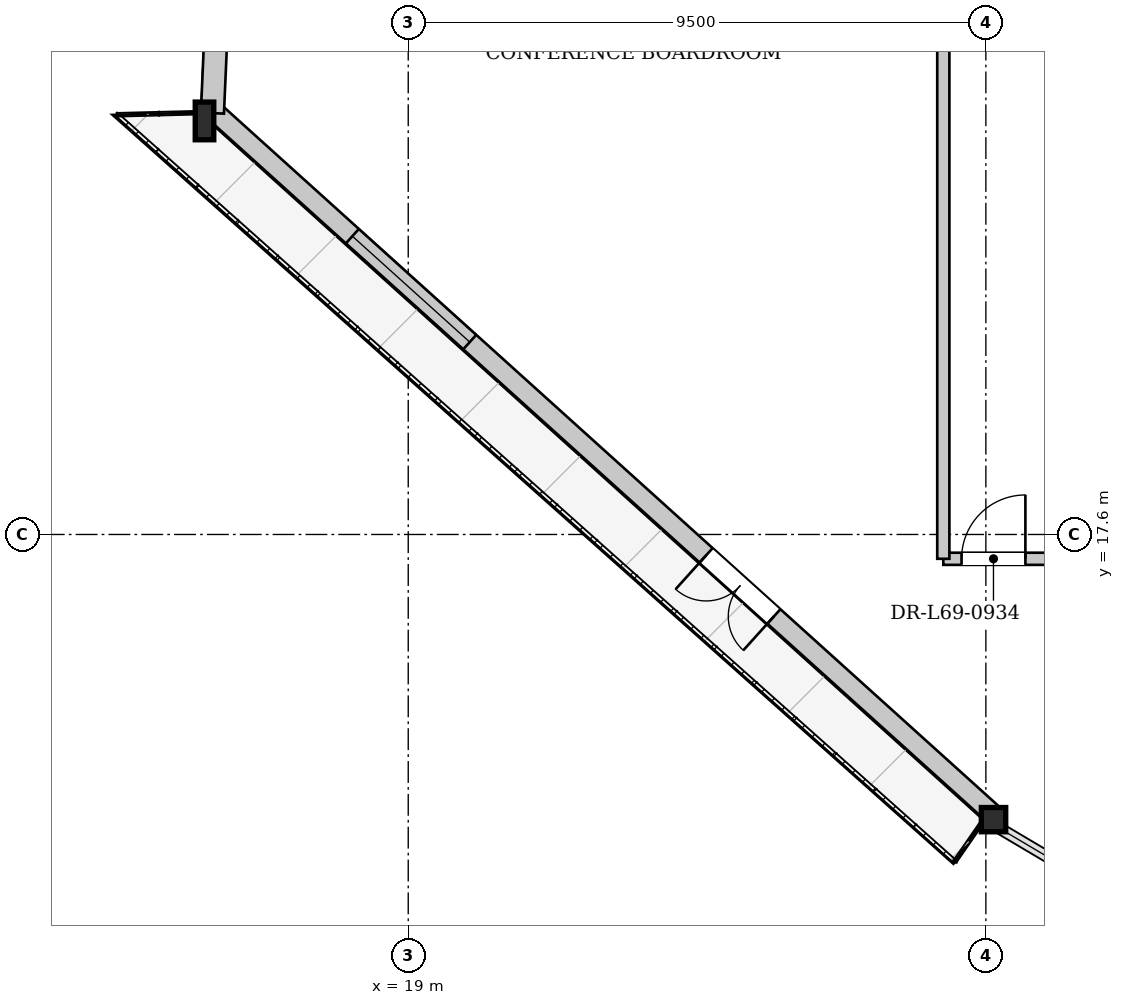
"""IFC4 building model, lengths in metres.
Left out: names, types, materials, properties, quantities, classifications, styles, units other than length and angle.
Written with IfcOpenShell. Run it as: python <this file> out.ifc"""

import sys

from ifc_helpers import new_model, si_unit, direction, frame, frame_2d, origin, origin_2d, place, context, subcontext, project, spatial, rectangle, i_section, extrude, source, transform, mapped, element, fill, save


model = new_model("IFC4")
c1 = context("Model", 3, precision=1e-05, world=origin(), true_north=direction((0.0, 1.0)))
c2 = subcontext(c1, "Body", "Model", "MODEL_VIEW")
j1 = project(units=[si_unit("LENGTHUNIT", "METRE"), si_unit("PLANEANGLEUNIT", "RADIAN")], contexts=[c1])
p1 = place(None, origin())
s1 = spatial("IfcSite", under=j1, at=p1, CompositionType="ELEMENT")
p2 = place(p1, origin())
s2 = spatial("IfcBuilding", under=s1, at=p2, CompositionType="ELEMENT")
p3 = place(p2, frame((0.0, 0.0, 259.7)))
s3 = spatial("IfcBuildingStorey", under=s2, at=p3, CompositionType="ELEMENT", Elevation=259.7)
m1 = source(origin(), c2, "Body", "SweptSolid", [
    extrude(i_section(OverallWidth=0.305, OverallDepth=0.62, WebThickness=0.021, FlangeThickness=0.04, at=origin_2d()), origin(), (0.0, 0.0, 1.0), 3.448),
])
p4 = place(p3, frame((15.59, 24.537, 0.0), z_axis=(0.034553905001, -0.079233237083, 0.996257056081), x_axis=(0.916626708041, 0.399744265884, 0.0)))
e1 = element("IfcColumn", 1, at=p4, inside=s3, PredefinedType="COLUMN", context=c2, shape_type="MappedRepresentation", body=[
    mapped(m1, transform((0.0, 0.0, 0.0), x_axis=(1.0, 0.0, 0.0), y_axis=(0.0, 1.0, 0.0), z_axis=(0.0, 0.0, 1.0), scale=1.0)),
])
m2 = source(origin(), c2, "Body", "SweptSolid", [
    extrude(i_section(OverallWidth=0.401, OverallDepth=0.399, WebThickness=0.022, FlangeThickness=0.034, at=origin_2d()), origin(), (0.0, 0.0, 1.0), 3.449),
])
p5 = place(p3, frame((28.472, 12.917, 0.0), z_axis=(0.08933509565, -0.00382257937, 0.995994291436), x_axis=(0.042750105391, 0.99908579636, 0.0)))
e2 = element("IfcColumn", 2, at=p5, inside=s3, PredefinedType="COLUMN", context=c2, shape_type="MappedRepresentation", body=[
    mapped(m2, transform((0.0, 0.0, 0.0), x_axis=(1.0, 0.0, 0.0), y_axis=(0.0, 1.0, 0.0), z_axis=(0.0, 0.0, 1.0), scale=1.0)),
])
p6 = place(p3, frame((28.579, 13.036, 0.0), z_axis=(0.0, 0.0, 1.0), x_axis=(-0.742527454329, 0.669815631027, 0.0)))
e3 = element("IfcWall", 3, at=p6, inside=s3, PredefinedType="SOLIDWALL", context=c2, shape_type="SweptSolid", body=[
    extrude(rectangle(XDim=17.349, YDim=0.32, at=frame_2d((8.674, 0.0))), origin(), (0.0, 0.0, 1.0), 2.872),
])
p7 = place(p6, frame((4.802, 0.0, 0.0)))
e4 = element("IfcOpeningElement", 4, at=p7, cuts=e3, PredefinedType="OPENING", context=c2, shape_type="SweptSolid", body=[
    extrude(rectangle(XDim=1.5, YDim=2.3, at=frame_2d((0.75, 1.15))), frame((0.0, 0.17, 0.0), z_axis=(0.0, -1.0, 0.0), x_axis=(1.0, 0.0, 0.0)), (0.0, 0.0, 1.0), 0.34),
])
p8 = place(p6, frame((11.538, 0.0, 0.402)))
e5 = element("IfcOpeningElement", 5, at=p8, cuts=e3, PredefinedType="OPENING", context=c2, shape_type="SweptSolid", body=[
    extrude(rectangle(XDim=2.6, YDim=2.35, at=frame_2d((1.3, 1.175))), frame((0.0, 0.17, 0.0), z_axis=(0.0, -1.0, 0.0), x_axis=(1.0, 0.0, 0.0)), (0.0, 0.0, 1.0), 0.34),
])
p9 = place(p3, frame((15.78, 24.529, 0.0), z_axis=(0.0, 0.0, 1.0), x_axis=(0.043578177518, 0.999050019991, 0.0)))
e6 = element("IfcWall", 6, at=p9, inside=s3, PredefinedType="SOLIDWALL", context=c2, shape_type="SweptSolid", body=[
    extrude(rectangle(XDim=2.706, YDim=0.38, at=frame_2d((1.353, 0.0))), origin(), (0.0, 0.0, 1.0), 2.872),
])
p10 = place(p3, frame((27.8, 17.2, 0.0), z_axis=(0.0, 0.0, 1.0), x_axis=(1.0, 0.0, 0.0)))
e7 = element("IfcWall", 7, at=p10, inside=s3, PredefinedType="PARTITIONING", context=c2, shape_type="SweptSolid", body=[
    extrude(rectangle(XDim=20.4, YDim=0.2, at=frame_2d((10.2, 0.0))), origin(), (0.0, 0.0, 1.0), 3.38),
])
p11 = place(p10, frame((0.3, 0.0, 0.0)))
e8 = element("IfcOpeningElement", 8, at=p11, cuts=e7, PredefinedType="OPENING", context=c2, shape_type="SweptSolid", body=[
    extrude(rectangle(XDim=1.05, YDim=2.2, at=frame_2d((0.525, 1.1))), frame((0.0, 0.11, 0.0), z_axis=(0.0, -1.0, 0.0), x_axis=(1.0, 0.0, 0.0)), (0.0, 0.0, 1.0), 0.22),
])
p12 = place(p10, frame((19.05, 0.0, 0.0)))
e9 = element("IfcOpeningElement", 9, at=p12, cuts=e7, PredefinedType="OPENING", context=c2, shape_type="SweptSolid", body=[
    extrude(rectangle(XDim=1.05, YDim=2.2, at=frame_2d((0.525, 1.1))), frame((0.0, 0.11, 0.0), z_axis=(0.0, -1.0, 0.0), x_axis=(1.0, 0.0, 0.0)), (0.0, 0.0, 1.0), 0.22),
])
p13 = place(p3, frame((27.8, 17.2, 0.0), z_axis=(0.0, 0.0, 1.0), x_axis=(0.0, 1.0, 0.0)))
e10 = element("IfcWall", 10, at=p13, inside=s3, PredefinedType="PARTITIONING", context=c2, shape_type="SweptSolid", body=[
    extrude(rectangle(XDim=18.749, YDim=0.2, at=frame_2d((9.375, 0.0))), origin(), (0.0, 0.0, 1.0), 3.38),
])
p14 = place(p13, frame((16.723, 0.0, 0.0)))
e11 = element("IfcOpeningElement", 11, at=p14, cuts=e10, PredefinedType="OPENING", context=c2, shape_type="SweptSolid", body=[
    extrude(rectangle(XDim=0.9, YDim=2.1, at=frame_2d((0.45, 1.05))), frame((0.0, 0.11, 0.0), z_axis=(0.0, -1.0, 0.0), x_axis=(1.0, 0.0, 0.0)), (0.0, 0.0, 1.0), 0.22),
])
m3 = source(origin(), c2, "Body", "SweptSolid", [
    extrude(rectangle(XDim=1.5, YDim=2.3, at=frame_2d((0.75, 1.15))), frame((0.0, 0.025, 0.0), z_axis=(0.0, -1.0, 0.0), x_axis=(1.0, 0.0, 0.0)), (0.0, 0.0, 1.0), 0.05),
])
p15 = place(p7, origin())
e12 = element("IfcDoor", 12, at=p15, inside=s3, OperationType="DOUBLE_DOOR_SINGLE_SWING", PredefinedType="DOOR", context=c2, shape_type="MappedRepresentation", body=[
    mapped(m3, transform((0.0, 0.0, 0.0), x_axis=(1.0, 0.0, 0.0), y_axis=(0.0, 1.0, 0.0), z_axis=(0.0, 0.0, 1.0), scale=1.0)),
])
fill(e4, e12)
m4 = source(origin(), c2, "Body", "SweptSolid", [
    extrude(rectangle(XDim=2.6, YDim=2.35, at=frame_2d((1.3, 1.175))), frame((0.0, 0.03, 0.0), z_axis=(0.0, -1.0, 0.0), x_axis=(1.0, 0.0, 0.0)), (0.0, 0.0, 1.0), 0.06),
])
p16 = place(p8, origin())
e13 = element("IfcWindow", 13, at=p16, inside=s3, PartitioningType="SINGLE_PANEL", PredefinedType="WINDOW", context=c2, shape_type="MappedRepresentation", body=[
    mapped(m4, transform((0.0, 0.0, 0.0), x_axis=(1.0, 0.0, 0.0), y_axis=(0.0, 1.0, 0.0), z_axis=(0.0, 0.0, 1.0), scale=1.0)),
])
fill(e5, e13)
m5 = source(origin(), c2, "Body", "SweptSolid", [
    extrude(rectangle(XDim=1.05, YDim=2.2, at=frame_2d((0.525, 1.1))), frame((0.0, 0.025, 0.0), z_axis=(0.0, -1.0, 0.0), x_axis=(1.0, 0.0, 0.0)), (0.0, 0.0, 1.0), 0.05),
])
p17 = place(p11, origin())
e14 = element("IfcDoor", 14, at=p17, inside=s3, OperationType="SINGLE_SWING_RIGHT", PredefinedType="DOOR", context=c2, shape_type="MappedRepresentation", body=[
    mapped(m5, transform((0.0, 0.0, 0.0), x_axis=(1.0, 0.0, 0.0), y_axis=(0.0, 1.0, 0.0), z_axis=(0.0, 0.0, 1.0), scale=1.0)),
])
fill(e8, e14)
save(model, sys.argv[1])
